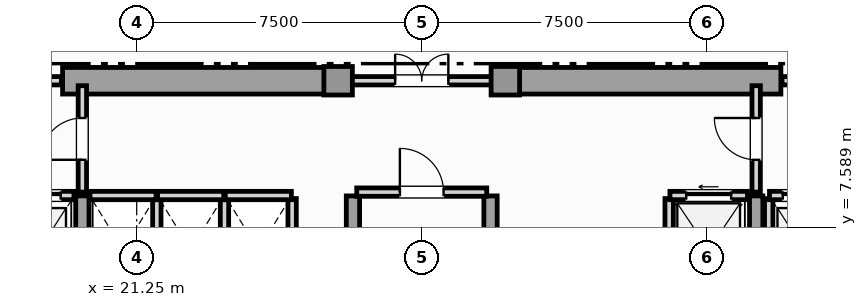
"""IFC4 building model, lengths in metres.
Left out: names, types, materials, properties, quantities, classifications, styles, units other than length and angle.
Written with IfcOpenShell. Run it as: python <this file> out.ifc"""

import sys

from ifc_helpers import new_model, si_unit, direction, frame, frame_2d, origin, origin_2d, place, context, subcontext, project, spatial, rectangle, extrude, element, fill, save


model = new_model("IFC4")
c1 = context("Model", 3, precision=1e-05, world=origin(), true_north=direction((0.0, 1.0)))
c2 = subcontext(c1, "Body", "Model", "MODEL_VIEW")
j1 = project(units=[si_unit("LENGTHUNIT", "METRE"), si_unit("PLANEANGLEUNIT", "RADIAN")], contexts=[c1])
p1 = place(None, origin())
s1 = spatial("IfcSite", under=j1, at=p1, CompositionType="ELEMENT")
p2 = place(p1, origin())
s2 = spatial("IfcBuilding", under=s1, at=p2, CompositionType="ELEMENT")
p3 = place(p2, frame((0.0, 0.0, 127.25)))
s3 = spatial("IfcBuildingStorey", under=s2, at=p3, CompositionType="ELEMENT", Elevation=127.25)
for number, where, z_axis, x_axis in (
    (1, (19.3, 11.45, 0.0), (0.0, 0.0, 1.0), (1.0, 0.0, 0.0)),
    (2, (30.9, 11.45, 0.0), (0.0, 0.0, 1.0), (1.0, 0.0, 0.0)),
):
    element("IfcWall", number, at=place(p3, frame(where, z_axis=z_axis, x_axis=x_axis)), inside=s3, PredefinedType="SHEAR", context=c2, shape_type="SweptSolid", body=[
        extrude(rectangle(XDim=7.3, YDim=0.7, at=frame_2d((3.65, 0.0))), origin(), (0.0, 0.0, 1.0), 3.6),
    ])
for number, where, z_axis, x_axis in (
    (3, (19.82, 0.92, 0.0), (0.0, 0.0, 1.0), (0.0, 1.0, 0.0)),
    (4, (26.94, 0.92, 0.0), (0.0, 0.0, 1.0), (0.0, 1.0, 0.0)),
    (5, (30.56, 0.92, 0.0), (0.0, 0.0, 1.0), (0.0, 1.0, 0.0)),
    (6, (37.55, 0.92, 0.0), (0.0, 0.0, 1.0), (0.0, 1.0, 0.0)),
):
    element("IfcWall", number, at=place(p3, frame(where, z_axis=z_axis, x_axis=x_axis)), inside=s3, PredefinedType="SHEAR", context=c2, shape_type="SweptSolid", body=[
        extrude(rectangle(XDim=7.5, YDim=0.35, at=frame_2d((3.75, 0.0))), origin(), (0.0, 0.0, 1.0), 3.6),
    ])
for number, where, z_axis, x_axis in (
    (7, (26.55, 11.45, 0.0), (0.0, 0.0, 1.0), (1.0, 0.0, 0.0)),
    (8, (30.95, 11.45, 0.0), (0.0, 0.0, 1.0), (1.0, 0.0, 0.0)),
):
    element("IfcColumn", number, at=place(p3, frame(where, z_axis=z_axis, x_axis=x_axis)), inside=s3, PredefinedType="COLUMN", context=c2, shape_type="SweptSolid", body=[
        extrude(rectangle(XDim=0.75, YDim=0.75, at=origin_2d()), origin(), (0.0, 0.0, 1.0), 3.85),
    ])
p4 = place(p3, frame((17.78, 8.43, 0.0), z_axis=(0.0, 0.0, 1.0), x_axis=(1.0, 0.0, 0.0)))
e9 = element("IfcWall", 9, at=p4, inside=s3, PredefinedType="SOLIDWALL", context=c2, shape_type="SweptSolid", body=[
    extrude(rectangle(XDim=1.82, YDim=0.22, at=frame_2d((0.91, 0.0))), origin(), (0.0, 0.0, 1.0), 3.6),
])
p5 = place(p4, frame((0.35, 0.0, 0.0)))
e10 = element("IfcOpeningElement", 10, at=p5, cuts=e9, PredefinedType="OPENING", context=c2, shape_type="SweptSolid", body=[
    extrude(rectangle(XDim=1.12, YDim=2.25, at=frame_2d((0.56, 1.125))), frame((0.0, 0.12, 0.0), z_axis=(0.0, -1.0, 0.0), x_axis=(1.0, 0.0, 0.0)), (0.0, 0.0, 1.0), 0.24),
])
p6 = place(p3, frame((37.88, 5.65, 0.0), z_axis=(0.0, 0.0, 1.0), x_axis=(0.0, 1.0, 0.0)))
e11 = element("IfcWall", 11, at=p6, inside=s3, PredefinedType="SOLIDWALL", context=c2, shape_type="SweptSolid", body=[
    extrude(rectangle(XDim=2.7, YDim=0.22, at=frame_2d((1.35, 0.0))), origin(), (0.0, 0.0, 1.0), 3.6),
])
p7 = place(p3, frame((37.9, 8.43, 0.0), z_axis=(0.0, 0.0, 1.0), x_axis=(1.0, 0.0, 0.0)))
e12 = element("IfcWall", 12, at=p7, inside=s3, PredefinedType="SOLIDWALL", context=c2, shape_type="SweptSolid", body=[
    extrude(rectangle(XDim=1.82, YDim=0.22, at=frame_2d((0.91, 0.0))), origin(), (0.0, 0.0, 1.0), 3.6),
])
p8 = place(p7, frame((0.35, 0.0, 0.0)))
e13 = element("IfcOpeningElement", 13, at=p8, cuts=e12, PredefinedType="OPENING", context=c2, shape_type="SweptSolid", body=[
    extrude(rectangle(XDim=1.12, YDim=2.25, at=frame_2d((0.56, 1.125))), frame((0.0, 0.12, 0.0), z_axis=(0.0, -1.0, 0.0), x_axis=(1.0, 0.0, 0.0)), (0.0, 0.0, 1.0), 0.24),
])
p9 = place(p3, frame((35.26, 5.65, 0.0), z_axis=(0.0, 0.0, 1.0), x_axis=(0.0, 1.0, 0.0)))
e14 = element("IfcWall", 14, at=p9, inside=s3, PredefinedType="SOLIDWALL", context=c2, shape_type="SweptSolid", body=[
    extrude(rectangle(XDim=2.7, YDim=0.22, at=frame_2d((1.35, 0.0))), origin(), (0.0, 0.0, 1.0), 3.6),
])
p10 = place(p3, frame((35.28, 8.43, 0.0), z_axis=(0.0, 0.0, 1.0), x_axis=(1.0, 0.0, 0.0)))
e15 = element("IfcWall", 15, at=p10, inside=s3, PredefinedType="SOLIDWALL", context=c2, shape_type="SweptSolid", body=[
    extrude(rectangle(XDim=2.04, YDim=0.22, at=frame_2d((1.02, 0.0))), origin(), (0.0, 0.0, 1.0), 3.6),
])
p11 = place(p10, frame((0.43, 0.0, 0.0)))
e16 = element("IfcOpeningElement", 16, at=p11, cuts=e15, PredefinedType="OPENING", context=c2, shape_type="SweptSolid", body=[
    extrude(rectangle(XDim=1.18, YDim=2.2, at=frame_2d((0.59, 1.1))), frame((0.0, 0.12, 0.0), z_axis=(0.0, -1.0, 0.0), x_axis=(1.0, 0.0, 0.0)), (0.0, 0.0, 1.0), 0.24),
])
p12 = place(p3, frame((21.78, 5.65, 0.0), z_axis=(0.0, 0.0, 1.0), x_axis=(0.0, 1.0, 0.0)))
e17 = element("IfcWall", 17, at=p12, inside=s3, PredefinedType="SOLIDWALL", context=c2, shape_type="SweptSolid", body=[
    extrude(rectangle(XDim=2.7, YDim=0.22, at=frame_2d((1.35, 0.0))), origin(), (0.0, 0.0, 1.0), 3.6),
])
p13 = place(p3, frame((20.02, 8.43, 0.0), z_axis=(0.0, 0.0, 1.0), x_axis=(1.0, 0.0, 0.0)))
e18 = element("IfcWall", 18, at=p13, inside=s3, PredefinedType="SOLIDWALL", context=c2, shape_type="SweptSolid", body=[
    extrude(rectangle(XDim=1.74, YDim=0.22, at=frame_2d((0.87, 0.0))), origin(), (0.0, 0.0, 1.0), 3.6),
])
p14 = place(p3, frame((23.56, 5.65, 0.0), z_axis=(0.0, 0.0, 1.0), x_axis=(0.0, 1.0, 0.0)))
e19 = element("IfcWall", 19, at=p14, inside=s3, PredefinedType="SOLIDWALL", context=c2, shape_type="SweptSolid", body=[
    extrude(rectangle(XDim=2.7, YDim=0.22, at=frame_2d((1.35, 0.0))), origin(), (0.0, 0.0, 1.0), 3.6),
])
p15 = place(p3, frame((21.8, 8.43, 0.0), z_axis=(0.0, 0.0, 1.0), x_axis=(1.0, 0.0, 0.0)))
e20 = element("IfcWall", 20, at=p15, inside=s3, PredefinedType="SOLIDWALL", context=c2, shape_type="SweptSolid", body=[
    extrude(rectangle(XDim=1.74, YDim=0.22, at=frame_2d((0.87, 0.0))), origin(), (0.0, 0.0, 1.0), 3.6),
])
p16 = place(p3, frame((25.34, 5.65, 0.0), z_axis=(0.0, 0.0, 1.0), x_axis=(0.0, 1.0, 0.0)))
e21 = element("IfcWall", 21, at=p16, inside=s3, PredefinedType="SOLIDWALL", context=c2, shape_type="SweptSolid", body=[
    extrude(rectangle(XDim=2.7, YDim=0.22, at=frame_2d((1.35, 0.0))), origin(), (0.0, 0.0, 1.0), 3.6),
])
p17 = place(p3, frame((23.58, 8.43, 0.0), z_axis=(0.0, 0.0, 1.0), x_axis=(1.0, 0.0, 0.0)))
e22 = element("IfcWall", 22, at=p17, inside=s3, PredefinedType="SOLIDWALL", context=c2, shape_type="SweptSolid", body=[
    extrude(rectangle(XDim=1.74, YDim=0.22, at=frame_2d((0.87, 0.0))), origin(), (0.0, 0.0, 1.0), 3.6),
])
p18 = place(p3, frame((27.04, 8.52, 0.0), z_axis=(0.0, 0.0, 1.0), x_axis=(1.0, 0.0, 0.0)))
e23 = element("IfcWall", 23, at=p18, inside=s3, PredefinedType="SOLIDWALL", context=c2, shape_type="SweptSolid", body=[
    extrude(rectangle(XDim=3.42, YDim=0.22, at=frame_2d((1.71, 0.0))), origin(), (0.0, 0.0, 1.0), 3.6),
])
p19 = place(p18, frame((1.135, 0.0, 0.0)))
e24 = element("IfcOpeningElement", 24, at=p19, cuts=e23, PredefinedType="OPENING", context=c2, shape_type="SweptSolid", body=[
    extrude(rectangle(XDim=1.15, YDim=2.2, at=frame_2d((0.575, 1.1))), frame((0.0, 0.12, 0.0), z_axis=(0.0, -1.0, 0.0), x_axis=(1.0, 0.0, 0.0)), (0.0, 0.0, 1.0), 0.24),
])
p20 = place(p3, frame((19.82, 8.52, 0.0), z_axis=(0.0, 0.0, 1.0), x_axis=(0.0, 1.0, 0.0)))
e25 = element("IfcWall", 25, at=p20, inside=s3, PredefinedType="SOLIDWALL", context=c2, shape_type="SweptSolid", body=[
    extrude(rectangle(XDim=2.8, YDim=0.22, at=frame_2d((1.4, 0.0))), origin(), (0.0, 0.0, 1.0), 3.055),
])
p21 = place(p20, frame((0.85, 0.0, 0.0)))
e26 = element("IfcOpeningElement", 26, at=p21, cuts=e25, PredefinedType="OPENING", context=c2, shape_type="SweptSolid", body=[
    extrude(rectangle(XDim=1.1, YDim=2.2, at=frame_2d((0.55, 1.1))), frame((0.0, 0.12, 0.0), z_axis=(0.0, -1.0, 0.0), x_axis=(1.0, 0.0, 0.0)), (0.0, 0.0, 1.0), 0.24),
])
p22 = place(p3, frame((37.55, 8.52, 0.0), z_axis=(0.0, 0.0, 1.0), x_axis=(0.0, 1.0, 0.0)))
e27 = element("IfcWall", 27, at=p22, inside=s3, PredefinedType="SOLIDWALL", context=c2, shape_type="SweptSolid", body=[
    extrude(rectangle(XDim=2.8, YDim=0.22, at=frame_2d((1.4, 0.0))), origin(), (0.0, 0.0, 1.0), 3.055),
])
p23 = place(p22, frame((0.85, 0.0, 0.0)))
e28 = element("IfcOpeningElement", 28, at=p23, cuts=e27, PredefinedType="OPENING", context=c2, shape_type="SweptSolid", body=[
    extrude(rectangle(XDim=1.1, YDim=2.2, at=frame_2d((0.55, 1.1))), frame((0.0, 0.12, 0.0), z_axis=(0.0, -1.0, 0.0), x_axis=(1.0, 0.0, 0.0)), (0.0, 0.0, 1.0), 0.24),
])
p24 = place(p3, frame((16.23, 11.45, 0.0), z_axis=(0.0, 0.0, 1.0), x_axis=(1.0, 0.0, 0.0)))
e29 = element("IfcWall", 29, at=p24, inside=s3, PredefinedType="SOLIDWALL", context=c2, shape_type="SweptSolid", body=[
    extrude(rectangle(XDim=3.04, YDim=0.22, at=frame_2d((1.52, 0.0))), origin(), (0.0, 0.0, 1.0), 3.6),
])
p25 = place(p24, frame((0.97, 0.0, 0.0)))
e30 = element("IfcOpeningElement", 30, at=p25, cuts=e29, PredefinedType="OPENING", context=c2, shape_type="SweptSolid", body=[
    extrude(rectangle(XDim=1.1, YDim=2.2, at=frame_2d((0.55, 1.1))), frame((0.0, 0.12, 0.0), z_axis=(0.0, -1.0, 0.0), x_axis=(1.0, 0.0, 0.0)), (0.0, 0.0, 1.0), 0.24),
])
p26 = place(p3, frame((26.63, 11.45, 0.0), z_axis=(0.0, 0.0, 1.0), x_axis=(1.0, 0.0, 0.0)))
e31 = element("IfcWall", 31, at=p26, inside=s3, PredefinedType="SOLIDWALL", context=c2, shape_type="SweptSolid", body=[
    extrude(rectangle(XDim=4.24, YDim=0.22, at=frame_2d((2.12, 0.0))), origin(), (0.0, 0.0, 1.0), 3.6),
])
p27 = place(p26, frame((1.42, 0.0, 0.0)))
e32 = element("IfcOpeningElement", 32, at=p27, cuts=e31, PredefinedType="OPENING", context=c2, shape_type="SweptSolid", body=[
    extrude(rectangle(XDim=1.4, YDim=2.2, at=frame_2d((0.7, 1.1))), frame((0.0, 0.12, 0.0), z_axis=(0.0, -1.0, 0.0), x_axis=(1.0, 0.0, 0.0)), (0.0, 0.0, 1.0), 0.24),
])
p28 = place(p3, frame((38.23, 11.45, 0.0), z_axis=(0.0, 0.0, 1.0), x_axis=(1.0, 0.0, 0.0)))
e33 = element("IfcWall", 33, at=p28, inside=s3, PredefinedType="SOLIDWALL", context=c2, shape_type="SweptSolid", body=[
    extrude(rectangle(XDim=3.04, YDim=0.22, at=frame_2d((1.52, 0.0))), origin(), (0.0, 0.0, 1.0), 3.6),
])
p29 = place(p28, frame((0.97, 0.0, 0.0)))
e34 = element("IfcOpeningElement", 34, at=p29, cuts=e33, PredefinedType="OPENING", context=c2, shape_type="SweptSolid", body=[
    extrude(rectangle(XDim=1.1, YDim=2.2, at=frame_2d((0.55, 1.1))), frame((0.0, 0.12, 0.0), z_axis=(0.0, -1.0, 0.0), x_axis=(1.0, 0.0, 0.0)), (0.0, 0.0, 1.0), 0.24),
])
p30 = place(p5, origin())
e35 = element("IfcDoor", 35, at=p30, inside=s3, OperationType="SLIDING_TO_LEFT", PredefinedType="DOOR", context=c2, shape_type="SweptSolid", body=[
    extrude(rectangle(XDim=1.12, YDim=2.25, at=frame_2d((0.56, 1.125))), frame((0.0, 0.025, 0.0), z_axis=(0.0, -1.0, 0.0), x_axis=(1.0, 0.0, 0.0)), (0.0, 0.0, 1.0), 0.05),
])
fill(e10, e35)
p31 = place(p8, origin())
e36 = element("IfcDoor", 36, at=p31, inside=s3, OperationType="SLIDING_TO_RIGHT", PredefinedType="DOOR", context=c2, shape_type="SweptSolid", body=[
    extrude(rectangle(XDim=1.12, YDim=2.25, at=frame_2d((0.56, 1.125))), frame((0.0, 0.025, 0.0), z_axis=(0.0, -1.0, 0.0), x_axis=(1.0, 0.0, 0.0)), (0.0, 0.0, 1.0), 0.05),
])
fill(e13, e36)
p32 = place(p11, origin())
e37 = element("IfcDoor", 37, at=p32, inside=s3, OperationType="SLIDING_TO_LEFT", PredefinedType="DOOR", context=c2, shape_type="SweptSolid", body=[
    extrude(rectangle(XDim=1.18, YDim=2.2, at=frame_2d((0.59, 1.1))), frame((0.0, 0.025, 0.0), z_axis=(0.0, -1.0, 0.0), x_axis=(1.0, 0.0, 0.0)), (0.0, 0.0, 1.0), 0.05),
])
fill(e16, e37)
p33 = place(p19, origin())
e38 = element("IfcDoor", 38, at=p33, inside=s3, OperationType="SINGLE_SWING_LEFT", PredefinedType="DOOR", context=c2, shape_type="SweptSolid", body=[
    extrude(rectangle(XDim=1.15, YDim=2.2, at=frame_2d((0.575, 1.1))), frame((0.0, 0.025, 0.0), z_axis=(0.0, -1.0, 0.0), x_axis=(1.0, 0.0, 0.0)), (0.0, 0.0, 1.0), 0.05),
])
fill(e24, e38)
p34 = place(p21, origin())
e39 = element("IfcDoor", 39, at=p34, inside=s3, OperationType="SINGLE_SWING_LEFT", PredefinedType="DOOR", context=c2, shape_type="SweptSolid", body=[
    extrude(rectangle(XDim=1.1, YDim=2.2, at=frame_2d((0.55, 1.1))), frame((0.0, 0.025, 0.0), z_axis=(0.0, -1.0, 0.0), x_axis=(1.0, 0.0, 0.0)), (0.0, 0.0, 1.0), 0.05),
])
fill(e26, e39)
p35 = place(p23, origin())
e40 = element("IfcDoor", 40, at=p35, inside=s3, OperationType="SINGLE_SWING_RIGHT", PredefinedType="DOOR", context=c2, shape_type="SweptSolid", body=[
    extrude(rectangle(XDim=1.1, YDim=2.2, at=frame_2d((0.55, 1.1))), frame((0.0, 0.025, 0.0), z_axis=(0.0, -1.0, 0.0), x_axis=(1.0, 0.0, 0.0)), (0.0, 0.0, 1.0), 0.05),
])
fill(e28, e40)
p36 = place(p27, origin())
e41 = element("IfcDoor", 41, at=p36, inside=s3, OperationType="DOUBLE_DOOR_SINGLE_SWING", PredefinedType="DOOR", context=c2, shape_type="SweptSolid", body=[
    extrude(rectangle(XDim=1.4, YDim=2.2, at=frame_2d((0.7, 1.1))), frame((0.0, 0.025, 0.0), z_axis=(0.0, -1.0, 0.0), x_axis=(1.0, 0.0, 0.0)), (0.0, 0.0, 1.0), 0.05),
])
fill(e32, e41)
save(model, sys.argv[1])
